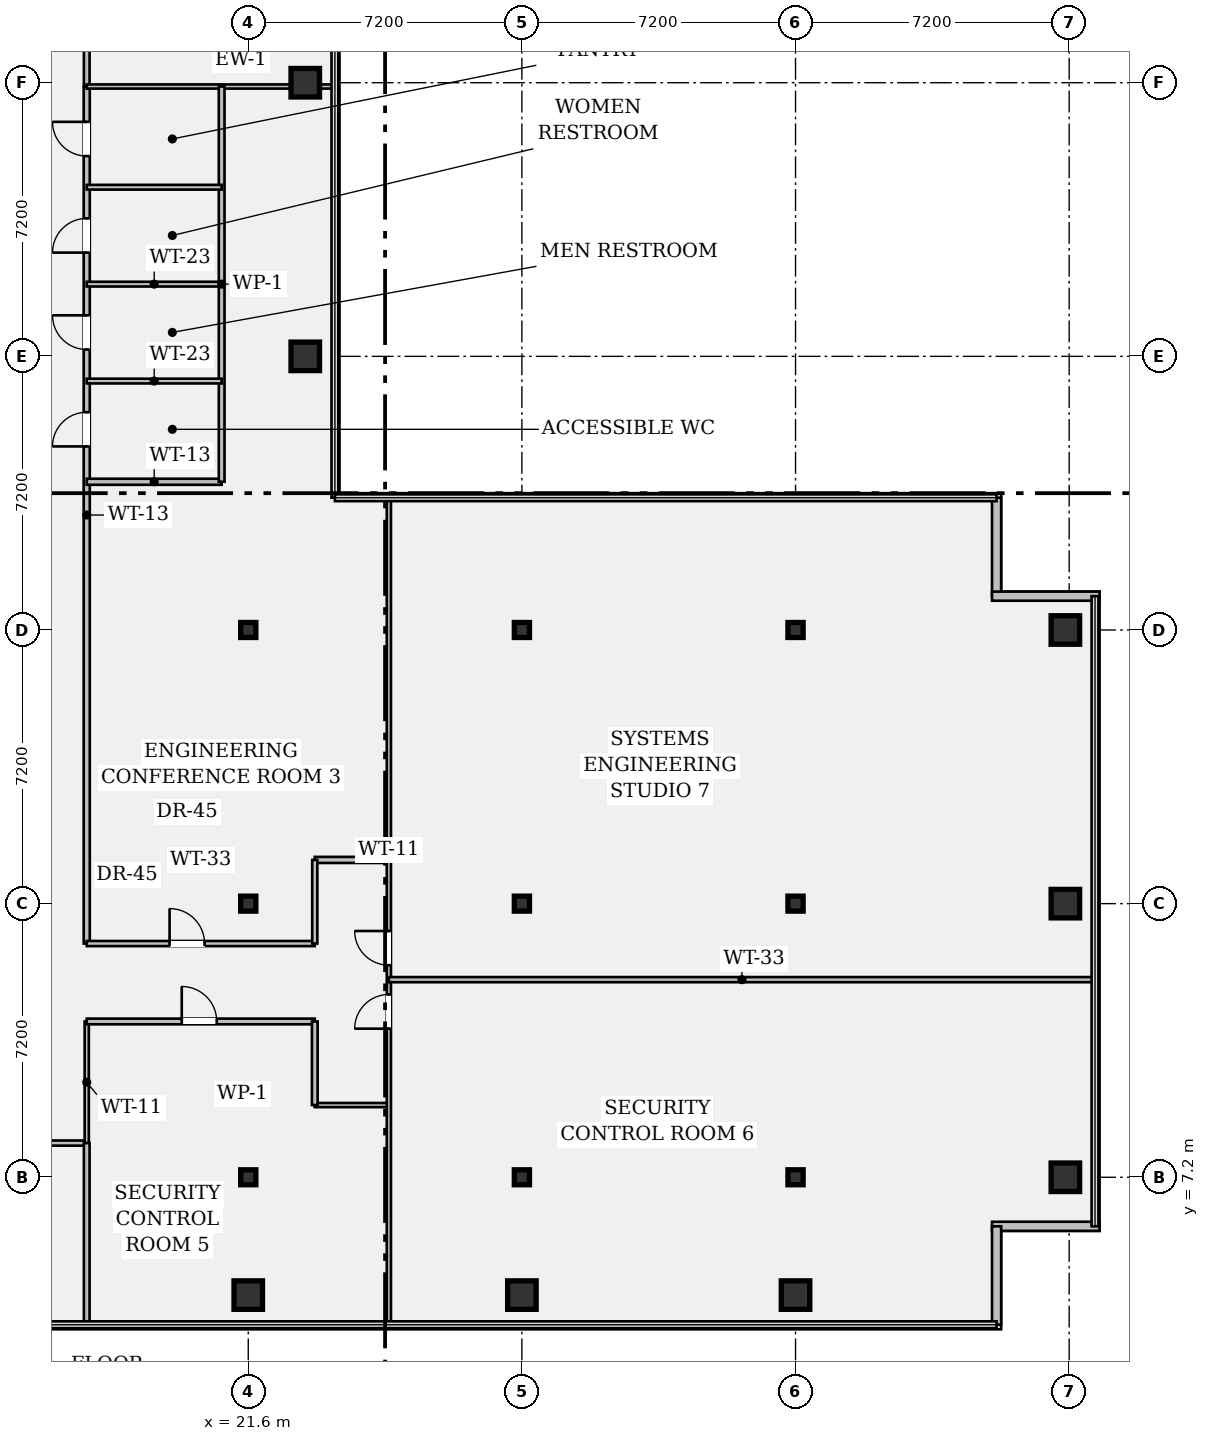
"""IFC4 building model, lengths in metres.
Left out: names, types, materials, properties, quantities, classifications, styles, units other than length and angle.
Written with IfcOpenShell. Run it as: python <this file> out.ifc"""

import sys

from ifc_helpers import new_model, si_unit, direction, frame, frame_2d, origin, origin_2d, place, context, subcontext, project, spatial, rectangle, hollow_rectangle, i_section, extrude, element, fill, save


model = new_model("IFC4")
c1 = context("Model", 3, precision=1e-05, world=origin(), true_north=direction((0.0, 1.0)))
c2 = subcontext(c1, "Body", "Model", "MODEL_VIEW")
j1 = project(units=[si_unit("LENGTHUNIT", "METRE"), si_unit("PLANEANGLEUNIT", "RADIAN")], contexts=[c1])
p1 = place(None, origin())
s1 = spatial("IfcSite", under=j1, at=p1, CompositionType="ELEMENT")
p2 = place(p1, origin())
s2 = spatial("IfcBuilding", under=s1, at=p2, CompositionType="ELEMENT")
p3 = place(p2, frame((0.0, 0.0, 201.25)))
s3 = spatial("IfcBuildingStorey", under=s2, at=p3, CompositionType="ELEMENT", Elevation=201.25)
p4 = place(p3, frame((21.6, 4.1, 0.0), z_axis=(0.0, 0.0, 1.0), x_axis=(1.0, 0.0, 0.0)))
e1 = element("IfcColumn", 1, at=p4, inside=s3, PredefinedType="COLUMN", context=c2, shape_type="SweptSolid", body=[
    extrude(hollow_rectangle(XDim=0.75, YDim=0.75, WallThickness=0.045, at=origin_2d()), origin(), (0.0, 0.0, 1.0), 3.24),
])
for number, where, z_axis, x_axis in (
    (2, (21.6, 7.2, 0.0), (0.0, 0.0, 1.0), (1.0, 0.0, 0.0)),
    (3, (21.6, 14.4, 0.0), (0.0, 0.0, 1.0), (1.0, 0.0, 0.0)),
    (4, (21.6, 21.6, 0.0), (0.0, 0.0, 1.0), (1.0, 0.0, 0.0)),
):
    element("IfcColumn", number, at=place(p3, frame(where, z_axis=z_axis, x_axis=x_axis)), inside=s3, PredefinedType="COLUMN", context=c2, shape_type="SweptSolid", body=[
        extrude(i_section(OverallWidth=0.399, OverallDepth=0.394, WebThickness=0.023, FlangeThickness=0.037, FilletRadius=0.018, at=origin_2d()), origin(), (0.0, 0.0, 1.0), 3.24),
    ])
for number, where, z_axis, x_axis in (
    (5, (23.1, 28.8, 0.0), (0.0, 0.0, 1.0), (1.0, 0.0, 0.0)),
    (6, (23.1, 36.0, 0.0), (0.0, 0.0, 1.0), (1.0, 0.0, 0.0)),
    (7, (28.8, 4.1, 0.0), (0.0, 0.0, 1.0), (1.0, 0.0, 0.0)),
):
    element("IfcColumn", number, at=place(p3, frame(where, z_axis=z_axis, x_axis=x_axis)), inside=s3, PredefinedType="COLUMN", context=c2, shape_type="SweptSolid", body=[
        extrude(hollow_rectangle(XDim=0.75, YDim=0.75, WallThickness=0.045, at=origin_2d()), origin(), (0.0, 0.0, 1.0), 3.24),
    ])
for number, where, z_axis, x_axis in (
    (8, (28.8, 7.2, 0.0), (0.0, 0.0, 1.0), (1.0, 0.0, 0.0)),
    (9, (28.8, 14.4, 0.0), (0.0, 0.0, 1.0), (1.0, 0.0, 0.0)),
    (10, (28.8, 21.6, 0.0), (0.0, 0.0, 1.0), (1.0, 0.0, 0.0)),
):
    element("IfcColumn", number, at=place(p3, frame(where, z_axis=z_axis, x_axis=x_axis)), inside=s3, PredefinedType="COLUMN", context=c2, shape_type="SweptSolid", body=[
        extrude(i_section(OverallWidth=0.399, OverallDepth=0.394, WebThickness=0.023, FlangeThickness=0.037, FilletRadius=0.018, at=origin_2d()), origin(), (0.0, 0.0, 1.0), 3.24),
    ])
p5 = place(p3, frame((36.0, 4.1, 0.0), z_axis=(0.0, 0.0, 1.0), x_axis=(1.0, 0.0, 0.0)))
e11 = element("IfcColumn", 11, at=p5, inside=s3, PredefinedType="COLUMN", context=c2, shape_type="SweptSolid", body=[
    extrude(hollow_rectangle(XDim=0.75, YDim=0.75, WallThickness=0.045, at=origin_2d()), origin(), (0.0, 0.0, 1.0), 3.24),
])
for number, where, z_axis, x_axis in (
    (12, (36.0, 7.2, 0.0), (0.0, 0.0, 1.0), (1.0, 0.0, 0.0)),
    (13, (36.0, 14.4, 0.0), (0.0, 0.0, 1.0), (1.0, 0.0, 0.0)),
    (14, (36.0, 21.6, 0.0), (0.0, 0.0, 1.0), (1.0, 0.0, 0.0)),
):
    element("IfcColumn", number, at=place(p3, frame(where, z_axis=z_axis, x_axis=x_axis)), inside=s3, PredefinedType="COLUMN", context=c2, shape_type="SweptSolid", body=[
        extrude(i_section(OverallWidth=0.399, OverallDepth=0.394, WebThickness=0.023, FlangeThickness=0.037, FilletRadius=0.018, at=origin_2d()), origin(), (0.0, 0.0, 1.0), 3.24),
    ])
for number, where, z_axis, x_axis in (
    (15, (43.1, 7.2, 0.0), (0.0, 0.0, 1.0), (1.0, 0.0, 0.0)),
    (16, (43.1, 14.4, 0.0), (0.0, 0.0, 1.0), (1.0, 0.0, 0.0)),
    (17, (43.1, 21.6, 0.0), (0.0, 0.0, 1.0), (1.0, 0.0, 0.0)),
):
    element("IfcColumn", number, at=place(p3, frame(where, z_axis=z_axis, x_axis=x_axis)), inside=s3, PredefinedType="COLUMN", context=c2, shape_type="SweptSolid", body=[
        extrude(hollow_rectangle(XDim=0.75, YDim=0.75, WallThickness=0.045, at=origin_2d()), origin(), (0.0, 0.0, 1.0), 3.24),
    ])
p6 = place(p3, frame((41.29, 25.08, 0.0), z_axis=(0.0, 0.0, 1.0), x_axis=(0.0, -1.0, 0.0)))
e18 = element("IfcWall", 18, at=p6, inside=s3, PredefinedType="STANDARD", context=c2, shape_type="SweptSolid", body=[
    extrude(rectangle(XDim=2.59, YDim=0.24, at=frame_2d((1.295, 0.0))), origin(), (0.0, 0.0, 1.0), 3.24),
])
for number, where, z_axis, x_axis in (
    (19, (41.17, 22.49, 0.0), (0.0, 0.0, 1.0), (1.0, 0.0, 0.0)),
    (20, (44.0, 5.91, 0.0), (0.0, 0.0, 1.0), (-1.0, 0.0, 0.0)),
):
    element("IfcWall", number, at=place(p3, frame(where, z_axis=z_axis, x_axis=x_axis)), inside=s3, PredefinedType="STANDARD", context=c2, shape_type="SweptSolid", body=[
        extrude(rectangle(XDim=2.83, YDim=0.24, at=frame_2d((1.415, 0.0))), origin(), (0.0, 0.0, 1.0), 3.24),
    ])
p7 = place(p3, frame((41.29, 5.91, 0.0), z_axis=(0.0, 0.0, 1.0), x_axis=(0.0, -1.0, 0.0)))
e21 = element("IfcWall", 21, at=p7, inside=s3, PredefinedType="STANDARD", context=c2, shape_type="SweptSolid", body=[
    extrude(rectangle(XDim=2.59, YDim=0.24, at=frame_2d((1.295, 0.0))), origin(), (0.0, 0.0, 1.0), 3.24),
])
p8 = place(p3, frame((14.4, 8.1, 0.0), z_axis=(0.0, 0.0, 1.0), x_axis=(1.0, 0.0, 0.0)))
e22 = element("IfcWall", 22, at=p8, inside=s3, PredefinedType="PARTITIONING", context=c2, shape_type="SweptSolid", body=[
    extrude(rectangle(XDim=2.95, YDim=0.135, at=frame_2d((1.475, 0.0))), origin(), (0.0, 0.0, 1.0), 2.808),
])
p9 = place(p8, frame((0.95, 0.0, 0.0)))
e23 = element("IfcOpeningElement", 23, at=p9, cuts=e22, PredefinedType="OPENING", context=c2, shape_type="SweptSolid", body=[
    extrude(rectangle(XDim=0.92, YDim=2.15, at=frame_2d((0.46, 1.075))), frame((0.0, 0.08, 0.0), z_axis=(0.0, -1.0, 0.0), x_axis=(1.0, 0.0, 0.0)), (0.0, 0.0, 1.0), 0.159),
])
p10 = place(p3, frame((17.35, 8.1, 0.0), z_axis=(0.0, 0.0, 1.0), x_axis=(0.0, 1.0, 0.0)))
e24 = element("IfcWall", 24, at=p10, inside=s3, PredefinedType="PARTITIONING", context=c2, shape_type="SweptSolid", body=[
    extrude(rectangle(XDim=3.2, YDim=0.11, at=frame_2d((1.6, 0.0))), origin(), (0.0, 0.0, 1.0), 3.24),
])
p11 = place(p3, frame((17.35, 13.35, 0.0), z_axis=(0.0, 0.0, 1.0), x_axis=(0.0, 1.0, 0.0)))
e25 = element("IfcWall", 25, at=p11, inside=s3, PredefinedType="PARTITIONING", context=c2, shape_type="SweptSolid", body=[
    extrude(rectangle(XDim=22.55, YDim=0.16, at=frame_2d((11.275, 0.0))), origin(), (0.0, 0.0, 1.0), 2.613),
])
p12 = place(p11, frame((13.08, 0.0, 0.0)))
e26 = element("IfcOpeningElement", 26, at=p12, cuts=e25, PredefinedType="OPENING", context=c2, shape_type="SweptSolid", body=[
    extrude(rectangle(XDim=0.9, YDim=2.15, at=frame_2d((0.45, 1.075))), frame((0.0, 0.092, 0.0), z_axis=(0.0, -1.0, 0.0), x_axis=(1.0, 0.0, 0.0)), (0.0, 0.0, 1.0), 0.184),
])
p13 = place(p11, frame((15.63, 0.0, 0.0)))
e27 = element("IfcOpeningElement", 27, at=p13, cuts=e25, PredefinedType="OPENING", context=c2, shape_type="SweptSolid", body=[
    extrude(rectangle(XDim=0.9, YDim=2.15, at=frame_2d((0.45, 1.075))), frame((0.0, 0.092, 0.0), z_axis=(0.0, -1.0, 0.0), x_axis=(1.0, 0.0, 0.0)), (0.0, 0.0, 1.0), 0.184),
])
p14 = place(p11, frame((18.18, 0.0, 0.0)))
e28 = element("IfcOpeningElement", 28, at=p14, cuts=e25, PredefinedType="OPENING", context=c2, shape_type="SweptSolid", body=[
    extrude(rectangle(XDim=0.9, YDim=2.15, at=frame_2d((0.45, 1.075))), frame((0.0, 0.092, 0.0), z_axis=(0.0, -1.0, 0.0), x_axis=(1.0, 0.0, 0.0)), (0.0, 0.0, 1.0), 0.184),
])
p15 = place(p11, frame((20.72, 0.0, 0.0)))
e29 = element("IfcOpeningElement", 29, at=p15, cuts=e25, PredefinedType="OPENING", context=c2, shape_type="SweptSolid", body=[
    extrude(rectangle(XDim=0.9, YDim=2.15, at=frame_2d((0.45, 1.075))), frame((0.0, 0.092, 0.0), z_axis=(0.0, -1.0, 0.0), x_axis=(1.0, 0.0, 0.0)), (0.0, 0.0, 1.0), 0.184),
])
p16 = place(p3, frame((17.35, 11.3, 0.0), z_axis=(0.0, 0.0, 1.0), x_axis=(1.0, 0.0, 0.0)))
e30 = element("IfcWall", 30, at=p16, inside=s3, PredefinedType="PARTITIONING", context=c2, shape_type="SweptSolid", body=[
    extrude(rectangle(XDim=6.0, YDim=0.15, at=frame_2d((3.0, 0.0))), origin(), (0.0, 0.0, 1.0), 2.613),
])
p17 = place(p16, frame((2.5, 0.0, 0.0)))
e31 = element("IfcOpeningElement", 31, at=p17, cuts=e30, PredefinedType="OPENING", context=c2, shape_type="SweptSolid", body=[
    extrude(rectangle(XDim=0.92, YDim=2.15, at=frame_2d((0.46, 1.075))), frame((0.0, 0.087, 0.0), z_axis=(0.0, -1.0, 0.0), x_axis=(1.0, 0.0, 0.0)), (0.0, 0.0, 1.0), 0.174),
])
p18 = place(p3, frame((17.35, 13.35, 0.0), z_axis=(0.0, 0.0, 1.0), x_axis=(1.0, 0.0, 0.0)))
e32 = element("IfcWall", 32, at=p18, inside=s3, PredefinedType="PARTITIONING", context=c2, shape_type="SweptSolid", body=[
    extrude(rectangle(XDim=6.0, YDim=0.135, at=frame_2d((3.0, 0.0))), origin(), (0.0, 0.0, 1.0), 2.613),
])
p19 = place(p18, frame((2.18, 0.0, 0.0)))
e33 = element("IfcOpeningElement", 33, at=p19, cuts=e32, PredefinedType="OPENING", context=c2, shape_type="SweptSolid", body=[
    extrude(rectangle(XDim=0.92, YDim=2.15, at=frame_2d((0.46, 1.075))), frame((0.0, 0.08, 0.0), z_axis=(0.0, -1.0, 0.0), x_axis=(1.0, 0.0, 0.0)), (0.0, 0.0, 1.0), 0.159),
])
p20 = place(p3, frame((23.35, 9.1, 0.0), z_axis=(0.0, 0.0, 1.0), x_axis=(1.0, 0.0, 0.0)))
e34 = element("IfcWall", 34, at=p20, inside=s3, PredefinedType="PARTITIONING", context=c2, shape_type="SweptSolid", body=[
    extrude(rectangle(XDim=1.95, YDim=0.11, at=frame_2d((0.975, 0.0))), origin(), (0.0, 0.0, 1.0), 2.808),
])
p21 = place(p3, frame((23.35, 15.55, 0.0), z_axis=(0.0, 0.0, 1.0), x_axis=(1.0, 0.0, 0.0)))
e35 = element("IfcWall", 35, at=p21, inside=s3, PredefinedType="PARTITIONING", context=c2, shape_type="SweptSolid", body=[
    extrude(rectangle(XDim=1.95, YDim=0.16, at=frame_2d((0.975, 0.0))), origin(), (0.0, 0.0, 1.0), 2.808),
])
p22 = place(p3, frame((23.35, 9.1, 0.0), z_axis=(0.0, 0.0, 1.0), x_axis=(0.0, 1.0, 0.0)))
e36 = element("IfcWall", 36, at=p22, inside=s3, PredefinedType="PARTITIONING", context=c2, shape_type="SweptSolid", body=[
    extrude(rectangle(XDim=2.2, YDim=0.15, at=frame_2d((1.1, 0.0))), origin(), (0.0, 0.0, 1.0), 2.808),
])
p23 = place(p3, frame((23.35, 13.35, 0.0), z_axis=(0.0, 0.0, 1.0), x_axis=(0.0, 1.0, 0.0)))
e37 = element("IfcWall", 37, at=p23, inside=s3, PredefinedType="PARTITIONING", context=c2, shape_type="SweptSolid", body=[
    extrude(rectangle(XDim=2.2, YDim=0.135, at=frame_2d((1.1, 0.0))), origin(), (0.0, 0.0, 1.0), 2.613),
])
p24 = place(p3, frame((25.3, 3.32, 0.0), z_axis=(0.0, 0.0, 1.0), x_axis=(0.0, 1.0, 0.0)))
e38 = element("IfcWall", 38, at=p24, inside=s3, PredefinedType="PARTITIONING", context=c2, shape_type="SweptSolid", body=[
    extrude(rectangle(XDim=21.76, YDim=0.11, at=frame_2d((10.88, 0.0))), origin(), (0.0, 0.0, 1.0), 2.613),
])
p25 = place(p24, frame((7.79, 0.0, 0.0)))
e39 = element("IfcOpeningElement", 39, at=p25, cuts=e38, PredefinedType="OPENING", context=c2, shape_type="SweptSolid", body=[
    extrude(rectangle(XDim=0.9, YDim=2.15, at=frame_2d((0.45, 1.075))), frame((0.0, 0.067, 0.0), z_axis=(0.0, -1.0, 0.0), x_axis=(1.0, 0.0, 0.0)), (0.0, 0.0, 1.0), 0.134),
])
p26 = place(p24, frame((9.46, 0.0, 0.0)))
e40 = element("IfcOpeningElement", 40, at=p26, cuts=e38, PredefinedType="OPENING", context=c2, shape_type="SweptSolid", body=[
    extrude(rectangle(XDim=0.9, YDim=2.15, at=frame_2d((0.45, 1.075))), frame((0.0, 0.067, 0.0), z_axis=(0.0, -1.0, 0.0), x_axis=(1.0, 0.0, 0.0)), (0.0, 0.0, 1.0), 0.134),
])
p27 = place(p3, frame((17.35, 35.9, 0.0), z_axis=(0.0, 0.0, 1.0), x_axis=(0.0, 1.0, 0.0)))
e41 = element("IfcWall", 41, at=p27, inside=s3, PredefinedType="PARTITIONING", context=c2, shape_type="SweptSolid", body=[
    extrude(rectangle(XDim=2.4, YDim=0.15, at=frame_2d((1.2, 0.0))), origin(), (0.0, 0.0, 1.0), 2.613),
])
p28 = place(p3, frame((17.35, 35.9, 0.0), z_axis=(0.0, 0.0, 1.0), x_axis=(1.0, 0.0, 0.0)))
e42 = element("IfcWall", 42, at=p28, inside=s3, PredefinedType="PARTITIONING", context=c2, shape_type="SweptSolid", body=[
    extrude(rectangle(XDim=6.53, YDim=0.11, at=frame_2d((3.265, 0.0))), origin(), (0.0, 0.0, 1.0), 2.613),
])
p29 = place(p3, frame((17.35, 25.5, 0.0), z_axis=(0.0, 0.0, 1.0), x_axis=(1.0, 0.0, 0.0)))
e43 = element("IfcWall", 43, at=p29, inside=s3, PredefinedType="PARTITIONING", context=c2, shape_type="SweptSolid", body=[
    extrude(rectangle(XDim=3.55, YDim=0.16, at=frame_2d((1.775, 0.0))), origin(), (0.0, 0.0, 1.0), 2.808),
])
p30 = place(p3, frame((20.9, 25.5, 0.0), z_axis=(0.0, 0.0, 1.0), x_axis=(0.0, 1.0, 0.0)))
e44 = element("IfcWall", 44, at=p30, inside=s3, PredefinedType="PARTITIONING", context=c2, shape_type="SweptSolid", body=[
    extrude(rectangle(XDim=10.4, YDim=0.15, at=frame_2d((5.2, 0.0))), origin(), (0.0, 0.0, 1.0), 2.613),
])
for number, where, z_axis, x_axis in (
    (45, (17.35, 28.15, 0.0), (0.0, 0.0, 1.0), (1.0, 0.0, 0.0)),
    (46, (17.35, 30.7, 0.0), (0.0, 0.0, 1.0), (1.0, 0.0, 0.0)),
    (47, (17.35, 33.25, 0.0), (0.0, 0.0, 1.0), (1.0, 0.0, 0.0)),
):
    element("IfcWall", number, at=place(p3, frame(where, z_axis=z_axis, x_axis=x_axis)), inside=s3, PredefinedType="PARTITIONING", context=c2, shape_type="SweptSolid", body=[
        extrude(rectangle(XDim=3.55, YDim=0.125, at=frame_2d((1.775, 0.0))), origin(), (0.0, 0.0, 1.0), 2.808),
    ])
p31 = place(p3, frame((17.35, 3.32, 0.0), z_axis=(0.0, 0.0, 1.0), x_axis=(0.0, 1.0, 0.0)))
e48 = element("IfcWall", 48, at=p31, inside=s3, PredefinedType="PARTITIONING", context=c2, shape_type="SweptSolid", body=[
    extrude(rectangle(XDim=4.78, YDim=0.15, at=frame_2d((2.39, 0.0))), origin(), (0.0, 0.0, 1.0), 2.613),
])
p32 = place(p3, frame((25.3, 12.4, 0.0), z_axis=(0.0, 0.0, 1.0), x_axis=(1.0, 0.0, 0.0)))
e49 = element("IfcWall", 49, at=p32, inside=s3, PredefinedType="PARTITIONING", context=c2, shape_type="SweptSolid", body=[
    extrude(rectangle(XDim=18.58, YDim=0.135, at=frame_2d((9.29, 0.0))), origin(), (0.0, 0.0, 1.0), 2.613),
])
p33 = place(p12, origin())
e50 = element("IfcDoor", 50, at=p33, inside=s3, OperationType="SINGLE_SWING_LEFT", PredefinedType="DOOR", context=c2, shape_type="SweptSolid", body=[
    extrude(rectangle(XDim=0.9, YDim=2.15, at=frame_2d((0.45, 1.075))), frame((0.0, 0.025, 0.0), z_axis=(0.0, -1.0, 0.0), x_axis=(1.0, 0.0, 0.0)), (0.0, 0.0, 1.0), 0.05),
])
fill(e26, e50)
p34 = place(p13, origin())
e51 = element("IfcDoor", 51, at=p34, inside=s3, OperationType="SINGLE_SWING_RIGHT", PredefinedType="DOOR", context=c2, shape_type="SweptSolid", body=[
    extrude(rectangle(XDim=0.9, YDim=2.15, at=frame_2d((0.45, 1.075))), frame((0.0, 0.025, 0.0), z_axis=(0.0, -1.0, 0.0), x_axis=(1.0, 0.0, 0.0)), (0.0, 0.0, 1.0), 0.05),
])
fill(e27, e51)
p35 = place(p14, origin())
e52 = element("IfcDoor", 52, at=p35, inside=s3, OperationType="SINGLE_SWING_LEFT", PredefinedType="DOOR", context=c2, shape_type="SweptSolid", body=[
    extrude(rectangle(XDim=0.9, YDim=2.15, at=frame_2d((0.45, 1.075))), frame((0.0, 0.025, 0.0), z_axis=(0.0, -1.0, 0.0), x_axis=(1.0, 0.0, 0.0)), (0.0, 0.0, 1.0), 0.05),
])
fill(e28, e52)
p36 = place(p15, origin())
e53 = element("IfcDoor", 53, at=p36, inside=s3, OperationType="SINGLE_SWING_RIGHT", PredefinedType="DOOR", context=c2, shape_type="SweptSolid", body=[
    extrude(rectangle(XDim=0.9, YDim=2.15, at=frame_2d((0.45, 1.075))), frame((0.0, 0.025, 0.0), z_axis=(0.0, -1.0, 0.0), x_axis=(1.0, 0.0, 0.0)), (0.0, 0.0, 1.0), 0.05),
])
fill(e29, e53)
p37 = place(p19, origin())
e54 = element("IfcDoor", 54, at=p37, inside=s3, OperationType="SINGLE_SWING_LEFT", PredefinedType="DOOR", context=c2, shape_type="SweptSolid", body=[
    extrude(rectangle(XDim=0.92, YDim=2.15, at=frame_2d((0.46, 1.075))), frame((0.0, 0.025, 0.0), z_axis=(0.0, -1.0, 0.0), x_axis=(1.0, 0.0, 0.0)), (0.0, 0.0, 1.0), 0.05),
])
fill(e33, e54)
p38 = place(p17, origin())
e55 = element("IfcDoor", 55, at=p38, inside=s3, OperationType="SINGLE_SWING_LEFT", PredefinedType="DOOR", context=c2, shape_type="SweptSolid", body=[
    extrude(rectangle(XDim=0.92, YDim=2.15, at=frame_2d((0.46, 1.075))), frame((0.0, 0.025, 0.0), z_axis=(0.0, -1.0, 0.0), x_axis=(1.0, 0.0, 0.0)), (0.0, 0.0, 1.0), 0.05),
])
fill(e31, e55)
p39 = place(p25, origin())
e56 = element("IfcDoor", 56, at=p39, inside=s3, OperationType="SINGLE_SWING_LEFT", PredefinedType="DOOR", context=c2, shape_type="SweptSolid", body=[
    extrude(rectangle(XDim=0.9, YDim=2.15, at=frame_2d((0.45, 1.075))), frame((0.0, 0.025, 0.0), z_axis=(0.0, -1.0, 0.0), x_axis=(1.0, 0.0, 0.0)), (0.0, 0.0, 1.0), 0.05),
])
fill(e39, e56)
p40 = place(p26, origin())
e57 = element("IfcDoor", 57, at=p40, inside=s3, OperationType="SINGLE_SWING_RIGHT", PredefinedType="DOOR", context=c2, shape_type="SweptSolid", body=[
    extrude(rectangle(XDim=0.9, YDim=2.15, at=frame_2d((0.45, 1.075))), frame((0.0, 0.025, 0.0), z_axis=(0.0, -1.0, 0.0), x_axis=(1.0, 0.0, 0.0)), (0.0, 0.0, 1.0), 0.05),
])
fill(e40, e57)
save(model, sys.argv[1])
